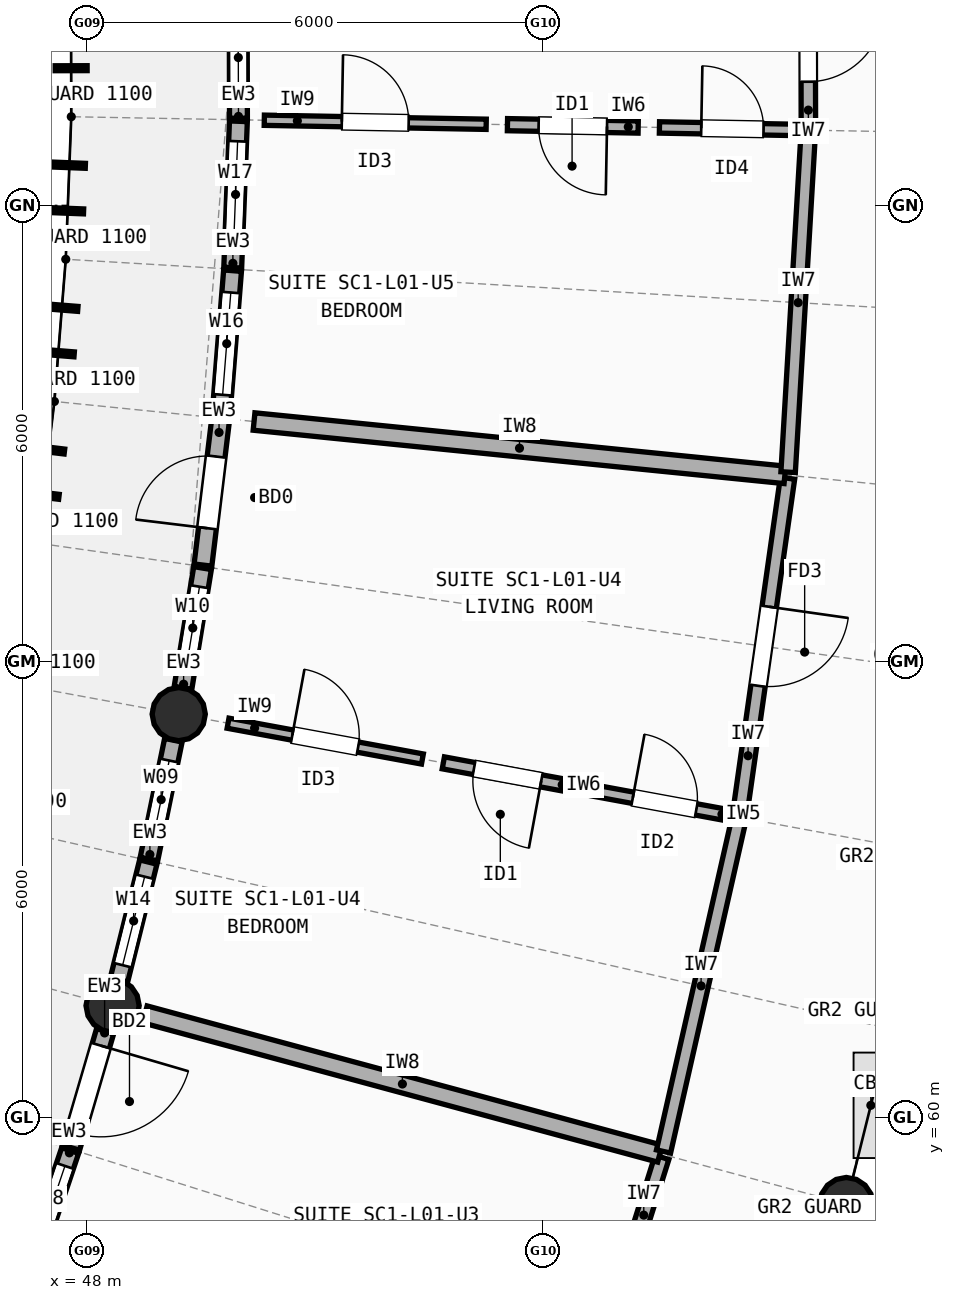
"""IFC4 building model, lengths in metres.
Left out: names, types, materials, properties, quantities, classifications, styles, units other than length and angle.
Written with IfcOpenShell. Run it as: python <this file> out.ifc"""

import sys

from ifc_helpers import new_model, si_unit, direction, frame, frame_2d, origin, origin_2d, place, context, subcontext, project, spatial, rectangle, circle, extrude, element, fill, save


model = new_model("IFC4")
c1 = context("Model", 3, precision=1e-05, world=origin(), true_north=direction((0.0, 1.0)))
c2 = subcontext(c1, "Body", "Model", "MODEL_VIEW")
j1 = project(units=[si_unit("LENGTHUNIT", "METRE"), si_unit("PLANEANGLEUNIT", "RADIAN")], contexts=[c1])
p1 = place(None, origin())
s1 = spatial("IfcSite", under=j1, at=p1, CompositionType="ELEMENT")
p2 = place(p1, origin())
s2 = spatial("IfcBuilding", under=s1, at=p2, CompositionType="ELEMENT")
p3 = place(p2, frame((0.0, 0.0, 4.5)))
s3 = spatial("IfcBuildingStorey", under=s2, at=p3, CompositionType="ELEMENT", Elevation=4.5)
for number, where, z_axis, x_axis in (
    (1, (48.336, 61.471, 0.0), (0.0, 0.0, 1.0), (1.0, 0.0, 0.0)),
    (2, (57.99, 58.861, 0.0), (0.0, 0.0, 1.0), (1.0, 0.0, 0.0)),
    (3, (49.206, 65.306, 0.0), (0.0, 0.0, 1.0), (1.0, 0.0, 0.0)),
):
    element("IfcColumn", number, at=place(p3, frame(where, z_axis=z_axis, x_axis=x_axis)), inside=s3, PredefinedType="COLUMN", context=c2, shape_type="SweptSolid", body=[
        extrude(circle(Radius=0.35, at=origin_2d()), origin(), (0.0, 0.0, 1.0), 2.948),
    ])
p4 = place(p3, frame((47.161, 57.739, 0.0), z_axis=(0.0, 0.0, 1.0), x_axis=(0.319798549746, 0.947485560618, 0.0)))
e4 = element("IfcWall", 4, at=p4, inside=s3, PredefinedType="STANDARD", context=c2, shape_type="SweptSolid", body=[
    extrude(rectangle(XDim=1.927, YDim=0.235, at=frame_2d((0.963, 0.0))), origin(), (0.0, 0.0, 1.0), 2.684),
])
p5 = place(p4, frame((0.213, 0.0, 0.85)))
e5 = element("IfcOpeningElement", 5, at=p5, cuts=e4, PredefinedType="OPENING", context=c2, shape_type="SweptSolid", body=[
    extrude(rectangle(XDim=1.5, YDim=1.4, at=frame_2d((0.75, 0.7))), frame((0.0, 0.127, 0.0), z_axis=(0.0, -1.0, 0.0), x_axis=(1.0, 0.0, 0.0)), (0.0, 0.0, 1.0), 0.255),
])
p6 = place(p3, frame((47.79, 59.603, 0.0), z_axis=(0.0, 0.0, 1.0), x_axis=(0.28073386291, 0.959785652224, 0.0)))
e6 = element("IfcWall", 6, at=p6, inside=s3, PredefinedType="STANDARD", context=c2, shape_type="SweptSolid", body=[
    extrude(rectangle(XDim=1.597, YDim=0.235, at=frame_2d((0.798, 0.0))), origin(), (0.0, 0.0, 1.0), 2.684),
])
p7 = place(p6, frame((0.198, 0.0, 0.0)))
e7 = element("IfcOpeningElement", 7, at=p7, cuts=e6, PredefinedType="OPENING", context=c2, shape_type="SweptSolid", body=[
    extrude(rectangle(XDim=1.2, YDim=2.15, at=frame_2d((0.6, 1.075))), frame((0.0, 0.127, 0.0), z_axis=(0.0, -1.0, 0.0), x_axis=(1.0, 0.0, 0.0)), (0.0, 0.0, 1.0), 0.255),
])
p8 = place(p3, frame((48.42, 61.811, 0.0), z_axis=(0.0, 0.0, 1.0), x_axis=(0.241240447943, 0.970465376135, 0.0)))
e8 = element("IfcWall", 8, at=p8, inside=s3, PredefinedType="STANDARD", context=c2, shape_type="SweptSolid", body=[
    extrude(rectangle(XDim=1.597, YDim=0.235, at=frame_2d((0.798, 0.0))), origin(), (0.0, 0.0, 1.0), 2.684),
])
p9 = place(p8, frame((0.198, 0.0, 0.85)))
e9 = element("IfcOpeningElement", 9, at=p9, cuts=e8, PredefinedType="OPENING", context=c2, shape_type="SweptSolid", body=[
    extrude(rectangle(XDim=1.2, YDim=1.5, at=frame_2d((0.6, 0.75))), frame((0.0, 0.127, 0.0), z_axis=(0.0, -1.0, 0.0), x_axis=(1.0, 0.0, 0.0)), (0.0, 0.0, 1.0), 0.255),
])
p10 = place(p3, frame((48.814, 63.399, 0.0), z_axis=(0.0, 0.0, 1.0), x_axis=(0.201199946108, 0.979550193551, 0.0)))
e10 = element("IfcWall", 10, at=p10, inside=s3, PredefinedType="STANDARD", context=c2, shape_type="SweptSolid", body=[
    extrude(rectangle(XDim=1.597, YDim=0.235, at=frame_2d((0.798, 0.0))), origin(), (0.0, 0.0, 1.0), 2.684),
])
p11 = place(p10, frame((0.273, 0.0, 0.85)))
e11 = element("IfcOpeningElement", 11, at=p11, cuts=e10, PredefinedType="OPENING", context=c2, shape_type="SweptSolid", body=[
    extrude(rectangle(XDim=1.05, YDim=1.35, at=frame_2d((0.525, 0.675))), frame((0.0, 0.127, 0.0), z_axis=(0.0, -1.0, 0.0), x_axis=(1.0, 0.0, 0.0)), (0.0, 0.0, 1.0), 0.255),
])
p12 = place(p3, frame((49.262, 65.652, 0.0), z_axis=(0.0, 0.0, 1.0), x_axis=(0.16100120568, 0.986954209561, 0.0)))
e12 = element("IfcWall", 12, at=p12, inside=s3, PredefinedType="STANDARD", context=c2, shape_type="SweptSolid", body=[
    extrude(rectangle(XDim=1.597, YDim=0.235, at=frame_2d((0.798, 0.0))), origin(), (0.0, 0.0, 1.0), 2.684),
])
p13 = place(p12, frame((0.249, 0.0, 0.85)))
e13 = element("IfcOpeningElement", 13, at=p13, cuts=e12, PredefinedType="OPENING", context=c2, shape_type="SweptSolid", body=[
    extrude(rectangle(XDim=1.1, YDim=1.45, at=frame_2d((0.55, 0.725))), frame((0.0, 0.127, 0.0), z_axis=(0.0, -1.0, 0.0), x_axis=(1.0, 0.0, 0.0)), (0.0, 0.0, 1.0), 0.255),
])
p14 = place(p3, frame((49.525, 67.268, 0.0), z_axis=(0.0, 0.0, 1.0), x_axis=(0.120384349076, 0.992727358592, 0.0)))
e14 = element("IfcWall", 14, at=p14, inside=s3, PredefinedType="STANDARD", context=c2, shape_type="SweptSolid", body=[
    extrude(rectangle(XDim=1.927, YDim=0.235, at=frame_2d((0.963, 0.0))), origin(), (0.0, 0.0, 1.0), 2.684),
])
p15 = place(p14, frame((0.488, 0.0, 0.0)))
e15 = element("IfcOpeningElement", 15, at=p15, cuts=e14, PredefinedType="OPENING", context=c2, shape_type="SweptSolid", body=[
    extrude(rectangle(XDim=0.95, YDim=2.12, at=frame_2d((0.475, 1.06))), frame((0.0, 0.127, 0.0), z_axis=(0.0, -1.0, 0.0), x_axis=(1.0, 0.0, 0.0)), (0.0, 0.0, 1.0), 0.255),
])
p16 = place(p3, frame((49.761, 69.22, 0.0), z_axis=(0.0, 0.0, 1.0), x_axis=(0.079573991137, 0.996828962227, 0.0)))
e16 = element("IfcWall", 16, at=p16, inside=s3, PredefinedType="STANDARD", context=c2, shape_type="SweptSolid", body=[
    extrude(rectangle(XDim=1.927, YDim=0.235, at=frame_2d((0.963, 0.0))), origin(), (0.0, 0.0, 1.0), 2.948),
])
p17 = place(p16, frame((0.289, 0.0, 0.85)))
e17 = element("IfcOpeningElement", 17, at=p17, cuts=e16, PredefinedType="OPENING", context=c2, shape_type="SweptSolid", body=[
    extrude(rectangle(XDim=1.35, YDim=1.5, at=frame_2d((0.675, 0.75))), frame((0.0, 0.127, 0.0), z_axis=(0.0, -1.0, 0.0), x_axis=(1.0, 0.0, 0.0)), (0.0, 0.0, 1.0), 0.255),
])
p18 = place(p3, frame((49.917, 71.181, 0.0), z_axis=(0.0, 0.0, 1.0), x_axis=(0.038647240614, 0.999252916329, 0.0)))
e18 = element("IfcWall", 18, at=p18, inside=s3, PredefinedType="STANDARD", context=c2, shape_type="SweptSolid", body=[
    extrude(rectangle(XDim=1.927, YDim=0.235, at=frame_2d((0.963, 0.0))), origin(), (0.0, 0.0, 1.0), 2.684),
])
p19 = place(p18, frame((0.263, 0.0, 0.85)))
e19 = element("IfcOpeningElement", 19, at=p19, cuts=e18, PredefinedType="OPENING", context=c2, shape_type="SweptSolid", body=[
    extrude(rectangle(XDim=1.4, YDim=1.5, at=frame_2d((0.7, 0.75))), frame((0.0, 0.127, 0.0), z_axis=(0.0, -1.0, 0.0), x_axis=(1.0, 0.0, 0.0)), (0.0, 0.0, 1.0), 0.255),
])
p20 = place(p3, frame((49.992, 73.146, 0.0), z_axis=(0.0, 0.0, 1.0), x_axis=(-0.002293571949, 0.99999736976, 0.0)))
e20 = element("IfcWall", 20, at=p20, inside=s3, PredefinedType="STANDARD", context=c2, shape_type="SweptSolid", body=[
    extrude(rectangle(XDim=1.597, YDim=0.235, at=frame_2d((0.798, 0.0))), origin(), (0.0, 0.0, 1.0), 2.684),
])
p21 = place(p20, frame((0.198, 0.0, 0.85)))
e21 = element("IfcOpeningElement", 21, at=p21, cuts=e20, PredefinedType="OPENING", context=c2, shape_type="SweptSolid", body=[
    extrude(rectangle(XDim=1.2, YDim=1.45, at=frame_2d((0.6, 0.725))), frame((0.0, 0.127, 0.0), z_axis=(0.0, -1.0, 0.0), x_axis=(1.0, 0.0, 0.0)), (0.0, 0.0, 1.0), 0.255),
])
p22 = place(p3, frame((54.222, 55.215, 0.0), z_axis=(0.0, 0.0, 1.0), x_axis=(0.300377958446, 0.953820256694, 0.0)))
e22 = element("IfcWall", 22, at=p22, inside=s3, PredefinedType="SOLIDWALL", context=c2, shape_type="SweptSolid", body=[
    extrude(rectangle(XDim=4.467, YDim=0.19, at=frame_2d((2.233, 0.0))), origin(), (0.0, 0.0, 1.0), 2.762),
])
p23 = place(p22, frame((1.743, 0.0, 0.0)))
e23 = element("IfcOpeningElement", 23, at=p23, cuts=e22, PredefinedType="OPENING", context=c2, shape_type="SweptSolid", body=[
    extrude(rectangle(XDim=0.98, YDim=2.15, at=frame_2d((0.49, 1.075))), frame((0.0, 0.105, 0.0), z_axis=(0.0, -1.0, 0.0), x_axis=(1.0, 0.0, 0.0)), (0.0, 0.0, 1.0), 0.21),
])
p24 = place(p3, frame((48.761, 61.356, 0.0), z_axis=(0.0, 0.0, 1.0), x_axis=(0.965329768393, -0.26103340448, 0.0)))
e24 = element("IfcWall", 24, at=p24, inside=s3, PredefinedType="SOLIDWALL", context=c2, shape_type="SweptSolid", body=[
    extrude(rectangle(XDim=7.02, YDim=0.23, at=frame_2d((3.51, 0.0))), origin(), (0.0, 0.0, 1.0), 2.722),
])
p25 = place(p3, frame((55.585, 59.552, 0.0), z_axis=(0.0, 0.0, 1.0), x_axis=(0.221221895428, 0.97522349899, 0.0)))
e25 = element("IfcWall", 25, at=p25, inside=s3, PredefinedType="SOLIDWALL", context=c2, shape_type="SweptSolid", body=[
    extrude(rectangle(XDim=4.467, YDim=0.19, at=frame_2d((2.234, 0.0))), origin(), (0.0, 0.0, 1.0), 2.742),
])
p26 = place(p3, frame((56.588, 63.988, 0.0), z_axis=(0.0, 0.0, 1.0), x_axis=(0.140732688284, 0.990047630394, 0.0)))
e26 = element("IfcWall", 26, at=p26, inside=s3, PredefinedType="SOLIDWALL", context=c2, shape_type="SweptSolid", body=[
    extrude(rectangle(XDim=4.467, YDim=0.19, at=frame_2d((2.233, 0.0))), origin(), (0.0, 0.0, 1.0), 2.722),
])
p27 = place(p26, frame((1.708, 0.0, 0.0)))
e27 = element("IfcOpeningElement", 27, at=p27, cuts=e26, PredefinedType="OPENING", context=c2, shape_type="SweptSolid", body=[
    extrude(rectangle(XDim=1.05, YDim=2.15, at=frame_2d((0.525, 1.075))), frame((0.0, 0.105, 0.0), z_axis=(0.0, -1.0, 0.0), x_axis=(1.0, 0.0, 0.0)), (0.0, 0.0, 1.0), 0.21),
])
p28 = place(p3, frame((49.855, 65.187, 0.0), z_axis=(0.0, 0.0, 1.0), x_axis=(0.983443502225, -0.181215004706, 0.0)))
e28 = element("IfcWall", 28, at=p28, inside=s3, PredefinedType="PARTITIONING", context=c2, shape_type="SweptSolid", body=[
    extrude(rectangle(XDim=2.6, YDim=0.135, at=frame_2d((1.3, 0.0))), origin(), (0.0, 0.0, 1.0), 2.762),
])
p29 = place(p28, frame((0.86, 0.0, 0.0)))
e29 = element("IfcOpeningElement", 29, at=p29, cuts=e28, PredefinedType="OPENING", context=c2, shape_type="SweptSolid", body=[
    extrude(rectangle(XDim=0.88, YDim=2.1, at=frame_2d((0.44, 1.05))), frame((0.0, 0.077, 0.0), z_axis=(0.0, -1.0, 0.0), x_axis=(1.0, 0.0, 0.0)), (0.0, 0.0, 1.0), 0.155),
])
p30 = place(p3, frame((52.688, 64.665, 0.0), z_axis=(0.0, 0.0, 1.0), x_axis=(0.983463169084, -0.181108241269, 0.0)))
e30 = element("IfcWall", 30, at=p30, inside=s3, PredefinedType="PLUMBINGWALL", context=c2, shape_type="SweptSolid", body=[
    extrude(rectangle(XDim=1.72, YDim=0.16, at=frame_2d((0.86, 0.0))), origin(), (0.0, 0.0, 1.0), 2.762),
])
p31 = place(p30, frame((0.41, 0.0, 0.0)))
e31 = element("IfcOpeningElement", 31, at=p31, cuts=e30, PredefinedType="OPENING", context=c2, shape_type="SweptSolid", body=[
    extrude(rectangle(XDim=0.9, YDim=2.1, at=frame_2d((0.45, 1.05))), frame((0.0, 0.09, 0.0), z_axis=(0.0, -1.0, 0.0), x_axis=(1.0, 0.0, 0.0)), (0.0, 0.0, 1.0), 0.18),
])
p32 = place(p3, frame((54.655, 64.303, 0.0), z_axis=(0.0, 0.0, 1.0), x_axis=(0.983468686283, -0.181078278933, 0.0)))
e32 = element("IfcWall", 32, at=p32, inside=s3, PredefinedType="PARTITIONING", context=c2, shape_type="SweptSolid", body=[
    extrude(rectangle(XDim=1.92, YDim=0.15, at=frame_2d((0.96, 0.0))), origin(), (0.0, 0.0, 1.0), 2.762),
])
p33 = place(p32, frame((0.535, 0.0, 0.0)))
e33 = element("IfcOpeningElement", 33, at=p33, cuts=e32, PredefinedType="OPENING", context=c2, shape_type="SweptSolid", body=[
    extrude(rectangle(XDim=0.85, YDim=2.1, at=frame_2d((0.425, 1.05))), frame((0.0, 0.085, 0.0), z_axis=(0.0, -1.0, 0.0), x_axis=(1.0, 0.0, 0.0)), (0.0, 0.0, 1.0), 0.17),
])
p34 = place(p3, frame((50.197, 69.156, 0.0), z_axis=(0.0, 0.0, 1.0), x_axis=(0.994988519083, -0.09998923389, 0.0)))
e34 = element("IfcWall", 34, at=p34, inside=s3, PredefinedType="SOLIDWALL", context=c2, shape_type="SweptSolid", body=[
    extrude(rectangle(XDim=7.02, YDim=0.23, at=frame_2d((3.51, 0.0))), origin(), (0.0, 0.0, 1.0), 2.742),
])
p35 = place(p3, frame((57.224, 68.49, 0.0), z_axis=(0.0, 0.0, 1.0), x_axis=(0.059132085895, 0.998250167252, 0.0)))
e35 = element("IfcWall", 35, at=p35, inside=s3, PredefinedType="SOLIDWALL", context=c2, shape_type="SweptSolid", body=[
    extrude(rectangle(XDim=4.467, YDim=0.19, at=frame_2d((2.234, 0.0))), origin(), (0.0, 0.0, 1.0), 2.762),
])
p36 = place(p3, frame((57.491, 73.029, 0.0), z_axis=(0.0, 0.0, 1.0), x_axis=(-0.0023367022, 0.999997269908, 0.0)))
e36 = element("IfcWall", 36, at=p36, inside=s3, PredefinedType="SOLIDWALL", context=c2, shape_type="SweptSolid", body=[
    extrude(rectangle(XDim=2.194, YDim=0.19, at=frame_2d((1.097, 0.0))), origin(), (0.0, 0.0, 1.0), 2.945),
])
p37 = place(p36, frame((0.597, 0.0, 0.0)))
e37 = element("IfcOpeningElement", 37, at=p37, cuts=e36, PredefinedType="OPENING", context=c2, shape_type="SweptSolid", body=[
    extrude(rectangle(XDim=1.0, YDim=2.15, at=frame_2d((0.5, 1.075))), frame((0.0, 0.105, 0.0), z_axis=(0.0, -1.0, 0.0), x_axis=(1.0, 0.0, 0.0)), (0.0, 0.0, 1.0), 0.21),
])
p38 = place(p3, frame((50.332, 73.12, 0.0), z_axis=(0.0, 0.0, 1.0), x_axis=(0.999833866331, -0.018227444628, 0.0)))
e38 = element("IfcWall", 38, at=p38, inside=s3, PredefinedType="PARTITIONING", context=c2, shape_type="SweptSolid", body=[
    extrude(rectangle(XDim=2.92, YDim=0.135, at=frame_2d((1.46, 0.0))), origin(), (0.0, 0.0, 1.0), 2.722),
])
p39 = place(p38, frame((1.02, 0.0, 0.0)))
e39 = element("IfcOpeningElement", 39, at=p39, cuts=e38, PredefinedType="OPENING", context=c2, shape_type="SweptSolid", body=[
    extrude(rectangle(XDim=0.88, YDim=2.1, at=frame_2d((0.44, 1.05))), frame((0.0, 0.077, 0.0), z_axis=(0.0, -1.0, 0.0), x_axis=(1.0, 0.0, 0.0)), (0.0, 0.0, 1.0), 0.155),
])
p40 = place(p3, frame((53.531, 73.062, 0.0), z_axis=(0.0, 0.0, 1.0), x_axis=(0.999832350792, -0.018310388026, 0.0)))
e40 = element("IfcWall", 40, at=p40, inside=s3, PredefinedType="PLUMBINGWALL", context=c2, shape_type="SweptSolid", body=[
    extrude(rectangle(XDim=1.72, YDim=0.16, at=frame_2d((0.86, 0.0))), origin(), (0.0, 0.0, 1.0), 2.722),
])
p41 = place(p40, frame((0.41, 0.0, 0.0)))
e41 = element("IfcOpeningElement", 41, at=p41, cuts=e40, PredefinedType="OPENING", context=c2, shape_type="SweptSolid", body=[
    extrude(rectangle(XDim=0.9, YDim=2.1, at=frame_2d((0.45, 1.05))), frame((0.0, 0.09, 0.0), z_axis=(0.0, -1.0, 0.0), x_axis=(1.0, 0.0, 0.0)), (0.0, 0.0, 1.0), 0.18),
])
p42 = place(p3, frame((55.531, 73.025, 0.0), z_axis=(0.0, 0.0, 1.0), x_axis=(0.99983466766, -0.018183436026, 0.0)))
e42 = element("IfcWall", 42, at=p42, inside=s3, PredefinedType="PARTITIONING", context=c2, shape_type="SweptSolid", body=[
    extrude(rectangle(XDim=1.92, YDim=0.15, at=frame_2d((0.96, 0.0))), origin(), (0.0, 0.0, 1.0), 2.722),
])
p43 = place(p42, frame((0.55, 0.0, 0.0)))
e43 = element("IfcOpeningElement", 43, at=p43, cuts=e42, PredefinedType="OPENING", context=c2, shape_type="SweptSolid", body=[
    extrude(rectangle(XDim=0.82, YDim=2.08, at=frame_2d((0.41, 1.04))), frame((0.0, 0.085, 0.0), z_axis=(0.0, -1.0, 0.0), x_axis=(1.0, 0.0, 0.0)), (0.0, 0.0, 1.0), 0.17),
])
p44 = place(p5, origin())
e44 = element("IfcWindow", 44, at=p44, inside=s3, PartitioningType="SINGLE_PANEL", PredefinedType="WINDOW", context=c2, shape_type="SweptSolid", body=[
    extrude(rectangle(XDim=1.5, YDim=1.4, at=frame_2d((0.75, 0.7))), frame((0.0, 0.03, 0.0), z_axis=(0.0, -1.0, 0.0), x_axis=(1.0, 0.0, 0.0)), (0.0, 0.0, 1.0), 0.06),
])
fill(e5, e44)
p45 = place(p7, origin())
e45 = element("IfcDoor", 45, at=p45, inside=s3, OperationType="SINGLE_SWING_RIGHT", PredefinedType="DOOR", context=c2, shape_type="SweptSolid", body=[
    extrude(rectangle(XDim=1.2, YDim=2.15, at=frame_2d((0.6, 1.075))), frame((0.0, 0.025, 0.0), z_axis=(0.0, -1.0, 0.0), x_axis=(1.0, 0.0, 0.0)), (0.0, 0.0, 1.0), 0.05),
])
fill(e7, e45)
p46 = place(p9, origin())
e46 = element("IfcWindow", 46, at=p46, inside=s3, PartitioningType="SINGLE_PANEL", PredefinedType="WINDOW", context=c2, shape_type="SweptSolid", body=[
    extrude(rectangle(XDim=1.2, YDim=1.5, at=frame_2d((0.6, 0.75))), frame((0.0, 0.03, 0.0), z_axis=(0.0, -1.0, 0.0), x_axis=(1.0, 0.0, 0.0)), (0.0, 0.0, 1.0), 0.06),
])
fill(e9, e46)
p47 = place(p11, origin())
e47 = element("IfcWindow", 47, at=p47, inside=s3, PartitioningType="SINGLE_PANEL", PredefinedType="WINDOW", context=c2, shape_type="SweptSolid", body=[
    extrude(rectangle(XDim=1.05, YDim=1.35, at=frame_2d((0.525, 0.675))), frame((0.0, 0.03, 0.0), z_axis=(0.0, -1.0, 0.0), x_axis=(1.0, 0.0, 0.0)), (0.0, 0.0, 1.0), 0.06),
])
fill(e11, e47)
p48 = place(p13, origin())
e48 = element("IfcWindow", 48, at=p48, inside=s3, PartitioningType="SINGLE_PANEL", PredefinedType="WINDOW", context=c2, shape_type="SweptSolid", body=[
    extrude(rectangle(XDim=1.1, YDim=1.45, at=frame_2d((0.55, 0.725))), frame((0.0, 0.03, 0.0), z_axis=(0.0, -1.0, 0.0), x_axis=(1.0, 0.0, 0.0)), (0.0, 0.0, 1.0), 0.06),
])
fill(e13, e48)
p49 = place(p15, origin())
e49 = element("IfcDoor", 49, at=p49, inside=s3, OperationType="SINGLE_SWING_LEFT", PredefinedType="DOOR", context=c2, shape_type="SweptSolid", body=[
    extrude(rectangle(XDim=0.95, YDim=2.12, at=frame_2d((0.475, 1.06))), frame((0.0, 0.025, 0.0), z_axis=(0.0, -1.0, 0.0), x_axis=(1.0, 0.0, 0.0)), (0.0, 0.0, 1.0), 0.05),
])
fill(e15, e49)
p50 = place(p17, origin())
e50 = element("IfcWindow", 50, at=p50, inside=s3, PartitioningType="SINGLE_PANEL", PredefinedType="WINDOW", context=c2, shape_type="SweptSolid", body=[
    extrude(rectangle(XDim=1.35, YDim=1.5, at=frame_2d((0.675, 0.75))), frame((0.0, 0.03, 0.0), z_axis=(0.0, -1.0, 0.0), x_axis=(1.0, 0.0, 0.0)), (0.0, 0.0, 1.0), 0.06),
])
fill(e17, e50)
p51 = place(p19, origin())
e51 = element("IfcWindow", 51, at=p51, inside=s3, PartitioningType="SINGLE_PANEL", PredefinedType="WINDOW", context=c2, shape_type="SweptSolid", body=[
    extrude(rectangle(XDim=1.4, YDim=1.5, at=frame_2d((0.7, 0.75))), frame((0.0, 0.03, 0.0), z_axis=(0.0, -1.0, 0.0), x_axis=(1.0, 0.0, 0.0)), (0.0, 0.0, 1.0), 0.06),
])
fill(e19, e51)
p52 = place(p21, origin())
e52 = element("IfcWindow", 52, at=p52, inside=s3, PartitioningType="SINGLE_PANEL", PredefinedType="WINDOW", context=c2, shape_type="SweptSolid", body=[
    extrude(rectangle(XDim=1.2, YDim=1.45, at=frame_2d((0.6, 0.725))), frame((0.0, 0.03, 0.0), z_axis=(0.0, -1.0, 0.0), x_axis=(1.0, 0.0, 0.0)), (0.0, 0.0, 1.0), 0.06),
])
fill(e21, e52)
p53 = place(p27, origin())
e53 = element("IfcDoor", 53, at=p53, inside=s3, OperationType="SINGLE_SWING_RIGHT", PredefinedType="DOOR", context=c2, shape_type="SweptSolid", body=[
    extrude(rectangle(XDim=1.05, YDim=2.15, at=frame_2d((0.525, 1.075))), frame((0.0, 0.025, 0.0), z_axis=(0.0, -1.0, 0.0), x_axis=(1.0, 0.0, 0.0)), (0.0, 0.0, 1.0), 0.05),
])
fill(e27, e53)
p54 = place(p29, origin())
e54 = element("IfcDoor", 54, at=p54, inside=s3, OperationType="SINGLE_SWING_LEFT", PredefinedType="DOOR", context=c2, shape_type="SweptSolid", body=[
    extrude(rectangle(XDim=0.88, YDim=2.1, at=frame_2d((0.44, 1.05))), frame((0.0, 0.025, 0.0), z_axis=(0.0, -1.0, 0.0), x_axis=(1.0, 0.0, 0.0)), (0.0, 0.0, 1.0), 0.05),
])
fill(e29, e54)
p55 = place(p31, origin())
e55 = element("IfcDoor", 55, at=p55, inside=s3, OperationType="SINGLE_SWING_RIGHT", PredefinedType="DOOR", context=c2, shape_type="SweptSolid", body=[
    extrude(rectangle(XDim=0.9, YDim=2.1, at=frame_2d((0.45, 1.05))), frame((0.0, 0.025, 0.0), z_axis=(0.0, -1.0, 0.0), x_axis=(1.0, 0.0, 0.0)), (0.0, 0.0, 1.0), 0.05),
])
fill(e31, e55)
p56 = place(p33, origin())
e56 = element("IfcDoor", 56, at=p56, inside=s3, OperationType="SINGLE_SWING_LEFT", PredefinedType="DOOR", context=c2, shape_type="SweptSolid", body=[
    extrude(rectangle(XDim=0.85, YDim=2.1, at=frame_2d((0.425, 1.05))), frame((0.0, 0.025, 0.0), z_axis=(0.0, -1.0, 0.0), x_axis=(1.0, 0.0, 0.0)), (0.0, 0.0, 1.0), 0.05),
])
fill(e33, e56)
p57 = place(p37, origin())
e57 = element("IfcDoor", 57, at=p57, inside=s3, OperationType="SINGLE_SWING_RIGHT", PredefinedType="DOOR", context=c2, shape_type="SweptSolid", body=[
    extrude(rectangle(XDim=1.0, YDim=2.15, at=frame_2d((0.5, 1.075))), frame((0.0, 0.025, 0.0), z_axis=(0.0, -1.0, 0.0), x_axis=(1.0, 0.0, 0.0)), (0.0, 0.0, 1.0), 0.05),
])
fill(e37, e57)
p58 = place(p39, origin())
e58 = element("IfcDoor", 58, at=p58, inside=s3, OperationType="SINGLE_SWING_LEFT", PredefinedType="DOOR", context=c2, shape_type="SweptSolid", body=[
    extrude(rectangle(XDim=0.88, YDim=2.1, at=frame_2d((0.44, 1.05))), frame((0.0, 0.025, 0.0), z_axis=(0.0, -1.0, 0.0), x_axis=(1.0, 0.0, 0.0)), (0.0, 0.0, 1.0), 0.05),
])
fill(e39, e58)
p59 = place(p41, origin())
e59 = element("IfcDoor", 59, at=p59, inside=s3, OperationType="SINGLE_SWING_RIGHT", PredefinedType="DOOR", context=c2, shape_type="SweptSolid", body=[
    extrude(rectangle(XDim=0.9, YDim=2.1, at=frame_2d((0.45, 1.05))), frame((0.0, 0.025, 0.0), z_axis=(0.0, -1.0, 0.0), x_axis=(1.0, 0.0, 0.0)), (0.0, 0.0, 1.0), 0.05),
])
fill(e41, e59)
p60 = place(p43, origin())
e60 = element("IfcDoor", 60, at=p60, inside=s3, OperationType="SINGLE_SWING_LEFT", PredefinedType="DOOR", context=c2, shape_type="SweptSolid", body=[
    extrude(rectangle(XDim=0.82, YDim=2.08, at=frame_2d((0.41, 1.04))), frame((0.0, 0.025, 0.0), z_axis=(0.0, -1.0, 0.0), x_axis=(1.0, 0.0, 0.0)), (0.0, 0.0, 1.0), 0.05),
])
fill(e43, e60)
save(model, sys.argv[1])
